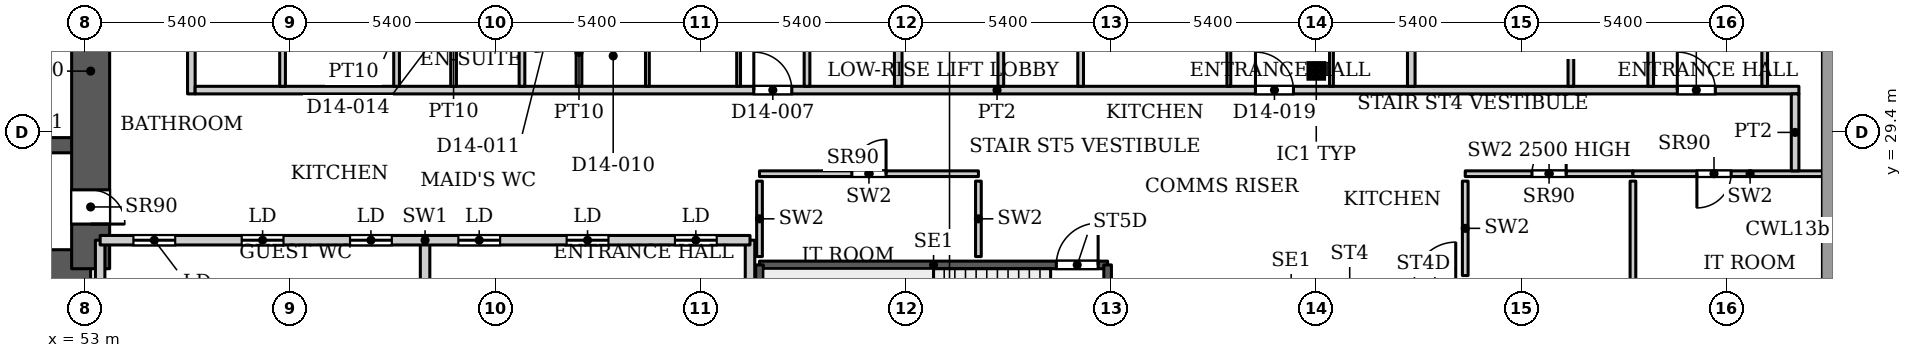
"""IFC4 building model, lengths in metres.
Left out: names, types, materials, properties, quantities, classifications, styles, units other than length and angle.
Written with IfcOpenShell. Run it as: python <this file> out.ifc"""

import sys

from ifc_helpers import new_model, si_unit, direction, frame, frame_2d, origin, origin_2d, place, context, subcontext, project, spatial, rectangle, hollow_rectangle, extrude, source, transform, mapped, element, fill, save


model = new_model("IFC4")
c1 = context("Model", 3, precision=1e-05, world=origin(), true_north=direction((0.0, 1.0)))
c2 = subcontext(c1, "Body", "Model", "MODEL_VIEW")
j1 = project(units=[si_unit("LENGTHUNIT", "METRE"), si_unit("PLANEANGLEUNIT", "RADIAN")], contexts=[c1])
p1 = place(None, origin())
s1 = spatial("IfcSite", under=j1, at=p1, CompositionType="ELEMENT")
p2 = place(p1, origin())
s2 = spatial("IfcBuilding", under=s1, at=p2, CompositionType="ELEMENT")
p3 = place(p2, frame((0.0, 0.0, 65.6)))
s3 = spatial("IfcBuildingStorey", under=s2, at=p3, CompositionType="ELEMENT", Elevation=65.6)
p4 = place(p3, frame((85.4, 31.005, 0.0), z_axis=(0.0, 0.0, 1.0), x_axis=(1.0, 0.0, 0.0)))
e1 = element("IfcColumn", 1, at=p4, inside=s3, PredefinedType="COLUMN", context=c2, shape_type="SweptSolid", body=[
    extrude(hollow_rectangle(XDim=0.356, YDim=0.356, WallThickness=0.016, InnerFilletRadius=0.016, OuterFilletRadius=0.032, at=origin_2d()), origin(), (0.0, 0.0, 1.0), 3.9),
])
p5 = place(p3, frame((34.75, 25.8, 0.0), z_axis=(0.0, 0.0, 1.0), x_axis=(1.0, 0.0, 0.0)))
e2 = element("IfcWall", 2, at=p5, inside=s3, PredefinedType="SHEAR", context=c2, shape_type="SweptSolid", body=[
    extrude(rectangle(XDim=18.4, YDim=1.0, at=frame_2d((9.2, 0.0))), origin(), (0.0, 0.0, 1.0), 3.9),
])
p6 = place(p3, frame((34.75, 29.05, 0.0), z_axis=(0.0, 0.0, 1.0), x_axis=(1.0, 0.0, 0.0)))
e3 = element("IfcWall", 3, at=p6, inside=s3, PredefinedType="SHEAR", context=c2, shape_type="SweptSolid", body=[
    extrude(rectangle(XDim=18.4, YDim=0.4, at=frame_2d((9.2, 0.0))), origin(), (0.0, 0.0, 1.0), 3.9),
])
p7 = place(p6, frame((15.125, 0.0, 0.0)))
e4 = element("IfcOpeningElement", 4, at=p7, cuts=e3, PredefinedType="OPENING", context=c2, shape_type="SweptSolid", body=[
    extrude(rectangle(XDim=1.1, YDim=2.2, at=frame_2d((0.55, 1.1))), frame((0.0, 0.21, 0.0), z_axis=(0.0, -1.0, 0.0), x_axis=(1.0, 0.0, 0.0)), (0.0, 0.0, 1.0), 0.42),
])
p8 = place(p3, frame((53.15, 25.8, 0.0), z_axis=(0.0, 0.0, 1.0), x_axis=(0.0, 1.0, 0.0)))
e5 = element("IfcWall", 5, at=p8, inside=s3, PredefinedType="SHEAR", context=c2, shape_type="SweptSolid", body=[
    extrude(rectangle(XDim=10.4, YDim=1.0, at=frame_2d((5.2, 0.0))), origin(), (0.0, 0.0, 1.0), 3.9),
])
p9 = place(p8, frame((1.175, 0.0, 0.0)))
e6 = element("IfcOpeningElement", 6, at=p9, cuts=e5, PredefinedType="OPENING", context=c2, shape_type="SweptSolid", body=[
    extrude(rectangle(XDim=0.9, YDim=2.2, at=frame_2d((0.45, 1.1))), frame((0.0, 0.51, 0.0), z_axis=(0.0, -1.0, 0.0), x_axis=(1.0, 0.0, 0.0)), (0.0, 0.0, 1.0), 1.02),
])
p10 = place(p3, frame((70.75, 25.9, 0.0), z_axis=(0.0, 0.0, 1.0), x_axis=(1.0, 0.0, 0.0)))
e7 = element("IfcWall", 7, at=p10, inside=s3, PredefinedType="SHEAR", context=c2, shape_type="SweptSolid", body=[
    extrude(rectangle(XDim=9.16, YDim=0.2, at=frame_2d((4.58, 0.0))), origin(), (0.0, 0.0, 1.0), 3.9),
])
p11 = place(p10, frame((7.81, 0.0, 0.0)))
e8 = element("IfcOpeningElement", 8, at=p11, cuts=e7, PredefinedType="OPENING", context=c2, shape_type="SweptSolid", body=[
    extrude(rectangle(XDim=1.1, YDim=2.2, at=frame_2d((0.55, 1.1))), frame((0.0, 0.11, 0.0), z_axis=(0.0, -1.0, 0.0), x_axis=(1.0, 0.0, 0.0)), (0.0, 0.0, 1.0), 0.22),
])
for number, where, z_axis, x_axis in (
    (9, (70.75, 22.75, 0.0), (0.0, 0.0, 1.0), (0.0, 1.0, 0.0)),
    (10, (79.91, 22.75, 0.0), (0.0, 0.0, 1.0), (0.0, 1.0, 0.0)),
):
    element("IfcWall", number, at=place(p3, frame(where, z_axis=z_axis, x_axis=x_axis)), inside=s3, PredefinedType="SHEAR", context=c2, shape_type="SweptSolid", body=[
        extrude(rectangle(XDim=3.15, YDim=0.2, at=frame_2d((1.575, 0.0))), origin(), (0.0, 0.0, 1.0), 3.9),
    ])
for number, where, z_axis, x_axis in (
    (11, (53.4, 23.7, 0.0), (0.0, 0.0, 1.0), (0.0, 1.0, 0.0)),
    (12, (61.95, 23.7, 0.0), (0.0, 0.0, 1.0), (0.0, 1.0, 0.0)),
    (13, (70.5, 23.7, 0.0), (0.0, 0.0, 1.0), (0.0, 1.0, 0.0)),
):
    element("IfcWall", number, at=place(p3, frame(where, z_axis=z_axis, x_axis=x_axis)), inside=s3, PredefinedType="PARTITIONING", context=c2, shape_type="SweptSolid", body=[
        extrude(rectangle(XDim=2.85, YDim=0.25, at=frame_2d((1.425, 0.0))), origin(), (0.0, 0.0, 1.0), 3.9),
    ])
p12 = place(p3, frame((53.4, 26.55, 0.0), z_axis=(0.0, 0.0, 1.0), x_axis=(1.0, 0.0, 0.0)))
e14 = element("IfcWall", 14, at=p12, inside=s3, PredefinedType="PARTITIONING", context=c2, shape_type="SweptSolid", body=[
    extrude(rectangle(XDim=17.1, YDim=0.25, at=frame_2d((8.55, 0.0))), origin(), (0.0, 0.0, 1.0), 3.9),
])
p13 = place(p12, frame((0.875, 0.0, 0.0)))
e15 = element("IfcOpeningElement", 15, at=p13, cuts=e14, PredefinedType="OPENING", context=c2, shape_type="SweptSolid", body=[
    extrude(rectangle(XDim=1.1, YDim=2.2, at=frame_2d((0.55, 1.1))), frame((0.0, 0.135, 0.0), z_axis=(0.0, -1.0, 0.0), x_axis=(1.0, 0.0, 0.0)), (0.0, 0.0, 1.0), 0.27),
])
p14 = place(p12, frame((3.725, 0.0, 0.0)))
e16 = element("IfcOpeningElement", 16, at=p14, cuts=e14, PredefinedType="OPENING", context=c2, shape_type="SweptSolid", body=[
    extrude(rectangle(XDim=1.1, YDim=2.2, at=frame_2d((0.55, 1.1))), frame((0.0, 0.135, 0.0), z_axis=(0.0, -1.0, 0.0), x_axis=(1.0, 0.0, 0.0)), (0.0, 0.0, 1.0), 0.27),
])
p15 = place(p12, frame((6.575, 0.0, 0.0)))
e17 = element("IfcOpeningElement", 17, at=p15, cuts=e14, PredefinedType="OPENING", context=c2, shape_type="SweptSolid", body=[
    extrude(rectangle(XDim=1.1, YDim=2.2, at=frame_2d((0.55, 1.1))), frame((0.0, 0.135, 0.0), z_axis=(0.0, -1.0, 0.0), x_axis=(1.0, 0.0, 0.0)), (0.0, 0.0, 1.0), 0.27),
])
p16 = place(p12, frame((9.425, 0.0, 0.0)))
e18 = element("IfcOpeningElement", 18, at=p16, cuts=e14, PredefinedType="OPENING", context=c2, shape_type="SweptSolid", body=[
    extrude(rectangle(XDim=1.1, YDim=2.2, at=frame_2d((0.55, 1.1))), frame((0.0, 0.135, 0.0), z_axis=(0.0, -1.0, 0.0), x_axis=(1.0, 0.0, 0.0)), (0.0, 0.0, 1.0), 0.27),
])
p17 = place(p12, frame((12.275, 0.0, 0.0)))
e19 = element("IfcOpeningElement", 19, at=p17, cuts=e14, PredefinedType="OPENING", context=c2, shape_type="SweptSolid", body=[
    extrude(rectangle(XDim=1.1, YDim=2.2, at=frame_2d((0.55, 1.1))), frame((0.0, 0.135, 0.0), z_axis=(0.0, -1.0, 0.0), x_axis=(1.0, 0.0, 0.0)), (0.0, 0.0, 1.0), 0.27),
])
p18 = place(p12, frame((15.125, 0.0, 0.0)))
e20 = element("IfcOpeningElement", 20, at=p18, cuts=e14, PredefinedType="OPENING", context=c2, shape_type="SweptSolid", body=[
    extrude(rectangle(XDim=1.1, YDim=2.2, at=frame_2d((0.55, 1.1))), frame((0.0, 0.135, 0.0), z_axis=(0.0, -1.0, 0.0), x_axis=(1.0, 0.0, 0.0)), (0.0, 0.0, 1.0), 0.27),
])
p19 = place(p3, frame((70.75, 28.3, 0.0), z_axis=(0.0, 0.0, 1.0), x_axis=(1.0, 0.0, 0.0)))
e21 = element("IfcWall", 21, at=p19, inside=s3, PredefinedType="PARTITIONING", context=c2, shape_type="SweptSolid", body=[
    extrude(rectangle(XDim=5.76, YDim=0.15, at=frame_2d((2.88, 0.0))), origin(), (0.0, 0.0, 1.0), 3.9),
])
p20 = place(p19, frame((2.43, 0.0, 0.0)))
e22 = element("IfcOpeningElement", 22, at=p20, cuts=e21, PredefinedType="OPENING", context=c2, shape_type="SweptSolid", body=[
    extrude(rectangle(XDim=0.9, YDim=2.2, at=frame_2d((0.45, 1.1))), frame((0.0, 0.085, 0.0), z_axis=(0.0, -1.0, 0.0), x_axis=(1.0, 0.0, 0.0)), (0.0, 0.0, 1.0), 0.17),
])
for number, where, z_axis, x_axis in (
    (23, (70.75, 26.12, 0.0), (0.0, 0.0, 1.0), (0.0, 1.0, 0.0)),
    (24, (76.51, 26.12, 0.0), (0.0, 0.0, 1.0), (0.0, 1.0, 0.0)),
):
    element("IfcWall", number, at=place(p3, frame(where, z_axis=z_axis, x_axis=x_axis)), inside=s3, PredefinedType="PARTITIONING", context=c2, shape_type="SweptSolid", body=[
        extrude(rectangle(XDim=1.985, YDim=0.15, at=frame_2d((0.992, 0.0))), origin(), (0.0, 0.0, 1.0), 3.9),
    ])
p21 = place(p3, frame((89.32, 28.3, 0.0), z_axis=(0.0, 0.0, 1.0), x_axis=(1.0, 0.0, 0.0)))
e25 = element("IfcWall", 25, at=p21, inside=s3, PredefinedType="PARTITIONING", context=c2, shape_type="SweptSolid", body=[
    extrude(rectangle(XDim=4.413, YDim=0.15, at=frame_2d((2.207, 0.0))), origin(), (0.0, 0.0, 1.0), 2.5),
])
p22 = place(p21, frame((1.756, 0.0, 0.0)))
e26 = element("IfcOpeningElement", 26, at=p22, cuts=e25, PredefinedType="OPENING", context=c2, shape_type="SweptSolid", body=[
    extrude(rectangle(XDim=0.9, YDim=2.2, at=frame_2d((0.45, 1.1))), frame((0.0, 0.085, 0.0), z_axis=(0.0, -1.0, 0.0), x_axis=(1.0, 0.0, 0.0)), (0.0, 0.0, 1.0), 0.17),
])
p23 = place(p3, frame((89.32, 25.62, 0.0), z_axis=(0.0, 0.0, 1.0), x_axis=(0.0, 1.0, 0.0)))
e27 = element("IfcWall", 27, at=p23, inside=s3, PredefinedType="PARTITIONING", context=c2, shape_type="SweptSolid", body=[
    extrude(rectangle(XDim=2.485, YDim=0.15, at=frame_2d((1.242, 0.0))), origin(), (0.0, 0.0, 1.0), 3.9),
])
p24 = place(p3, frame((93.733, 21.338, 0.0), z_axis=(0.0, 0.0, 1.0), x_axis=(0.0, 1.0, 0.0)))
e28 = element("IfcWall", 28, at=p24, inside=s3, PredefinedType="PARTITIONING", context=c2, shape_type="SweptSolid", body=[
    extrude(rectangle(XDim=6.767, YDim=0.15, at=frame_2d((3.384, 0.0))), origin(), (0.0, 0.0, 1.0), 3.9),
])
p25 = place(p3, frame((93.733, 28.3, 0.0), z_axis=(0.0, 0.0, 1.0), x_axis=(1.0, 0.0, 0.0)))
e29 = element("IfcWall", 29, at=p25, inside=s3, PredefinedType="PARTITIONING", context=c2, shape_type="SweptSolid", body=[
    extrude(rectangle(XDim=6.165, YDim=0.15, at=frame_2d((3.083, 0.0))), origin(), (0.0, 0.0, 1.0), 3.9),
])
p26 = place(p25, frame((1.683, 0.0, 0.0)))
e30 = element("IfcOpeningElement", 30, at=p26, cuts=e29, PredefinedType="OPENING", context=c2, shape_type="SweptSolid", body=[
    extrude(rectangle(XDim=0.9, YDim=2.2, at=frame_2d((0.45, 1.1))), frame((0.0, 0.085, 0.0), z_axis=(0.0, -1.0, 0.0), x_axis=(1.0, 0.0, 0.0)), (0.0, 0.0, 1.0), 0.17),
])
p27 = place(p3, frame((55.8, 30.4, 0.0), z_axis=(0.0, 0.0, 1.0), x_axis=(0.0, 1.0, 0.0)))
e31 = element("IfcWall", 31, at=p27, inside=s3, PredefinedType="PARTITIONING", context=c2, shape_type="SweptSolid", body=[
    extrude(rectangle(XDim=13.5, YDim=0.2, at=frame_2d((6.75, 0.0))), origin(), (0.0, 0.0, 1.0), 3.6),
])
p28 = place(p3, frame((55.9, 30.5, 0.0), z_axis=(0.0, 0.0, 1.0), x_axis=(1.0, 0.0, 0.0)))
e32 = element("IfcWall", 32, at=p28, inside=s3, PredefinedType="PARTITIONING", context=c2, shape_type="SweptSolid", body=[
    extrude(rectangle(XDim=42.2, YDim=0.2, at=frame_2d((21.1, 0.0))), origin(), (0.0, 0.0, 1.0), 3.6),
])
p29 = place(p28, frame((14.7, 0.0, 0.0)))
e33 = element("IfcOpeningElement", 33, at=p29, cuts=e32, PredefinedType="OPENING", context=c2, shape_type="SweptSolid", body=[
    extrude(rectangle(XDim=1.0, YDim=2.1, at=frame_2d((0.5, 1.05))), frame((0.0, 0.11, 0.0), z_axis=(0.0, -1.0, 0.0), x_axis=(1.0, 0.0, 0.0)), (0.0, 0.0, 1.0), 0.22),
])
p30 = place(p28, frame((27.9, 0.0, 0.0)))
e34 = element("IfcOpeningElement", 34, at=p30, cuts=e32, PredefinedType="OPENING", context=c2, shape_type="SweptSolid", body=[
    extrude(rectangle(XDim=1.0, YDim=2.1, at=frame_2d((0.5, 1.05))), frame((0.0, 0.11, 0.0), z_axis=(0.0, -1.0, 0.0), x_axis=(1.0, 0.0, 0.0)), (0.0, 0.0, 1.0), 0.22),
])
p31 = place(p28, frame((39.0, 0.0, 0.0)))
e35 = element("IfcOpeningElement", 35, at=p31, cuts=e32, PredefinedType="OPENING", context=c2, shape_type="SweptSolid", body=[
    extrude(rectangle(XDim=1.0, YDim=2.1, at=frame_2d((0.5, 1.05))), frame((0.0, 0.11, 0.0), z_axis=(0.0, -1.0, 0.0), x_axis=(1.0, 0.0, 0.0)), (0.0, 0.0, 1.0), 0.22),
])
p32 = place(p3, frame((58.2, 30.6, 0.0), z_axis=(0.0, 0.0, 1.0), x_axis=(0.0, 1.0, 0.0)))
e36 = element("IfcWall", 36, at=p32, inside=s3, PredefinedType="PARTITIONING", context=c2, shape_type="SweptSolid", body=[
    extrude(rectangle(XDim=3.025, YDim=0.15, at=frame_2d((1.512, 0.0))), origin(), (0.0, 0.0, 1.0), 3.072),
])
for number, where, z_axis, x_axis in (
    (37, (61.2, 30.6, 0.0), (0.0, 0.0, 1.0), (0.0, 1.0, 0.0)),
    (38, (62.7, 30.6, 0.0), (0.0, 0.0, 1.0), (0.0, 1.0, 0.0)),
    (39, (64.5, 30.6, 0.0), (0.0, 0.0, 1.0), (0.0, 1.0, 0.0)),
):
    element("IfcWall", number, at=place(p3, frame(where, z_axis=z_axis, x_axis=x_axis)), inside=s3, PredefinedType="PARTITIONING", context=c2, shape_type="SweptSolid", body=[
        extrude(rectangle(XDim=3.025, YDim=0.15, at=frame_2d((1.512, 0.0))), origin(), (0.0, 0.0, 1.0), 3.6),
    ])
p33 = place(p3, frame((66.0, 30.6, 0.0), z_axis=(0.0, 0.0, 1.0), x_axis=(0.0, 1.0, 0.0)))
e40 = element("IfcWall", 40, at=p33, inside=s3, PredefinedType="PARTITIONING", context=c2, shape_type="SweptSolid", body=[
    extrude(rectangle(XDim=1.775, YDim=0.15, at=frame_2d((0.887, 0.0))), origin(), (0.0, 0.0, 1.0), 3.6),
])
for number, where, z_axis, x_axis in (
    (41, (67.8, 30.6, 0.0), (0.0, 0.0, 1.0), (0.0, 1.0, 0.0)),
    (42, (70.2, 30.6, 0.0), (0.0, 0.0, 1.0), (0.0, 1.0, 0.0)),
):
    element("IfcWall", number, at=place(p3, frame(where, z_axis=z_axis, x_axis=x_axis)), inside=s3, PredefinedType="PARTITIONING", context=c2, shape_type="SweptSolid", body=[
        extrude(rectangle(XDim=3.025, YDim=0.1, at=frame_2d((1.512, 0.0))), origin(), (0.0, 0.0, 1.0), 3.6),
    ])
p34 = place(p3, frame((72.0, 30.6, 0.0), z_axis=(0.0, 0.0, 1.0), x_axis=(0.0, 1.0, 0.0)))
e43 = element("IfcWall", 43, at=p34, inside=s3, PredefinedType="PARTITIONING", context=c2, shape_type="SweptSolid", body=[
    extrude(rectangle(XDim=3.175, YDim=0.15, at=frame_2d((1.587, 0.0))), origin(), (0.0, 0.0, 1.0), 3.6),
])
p35 = place(p3, frame((74.4, 30.6, 0.0), z_axis=(0.0, 0.0, 1.0), x_axis=(0.0, 1.0, 0.0)))
e44 = element("IfcWall", 44, at=p35, inside=s3, PredefinedType="PARTITIONING", context=c2, shape_type="SweptSolid", body=[
    extrude(rectangle(XDim=13.3, YDim=0.2, at=frame_2d((6.65, 0.0))), origin(), (0.0, 0.0, 1.0), 3.6),
])
for number, where, z_axis, x_axis in (
    (45, (77.1, 30.6, 0.0), (0.0, 0.0, 1.0), (0.0, 1.0, 0.0)),
    (46, (79.2, 30.6, 0.0), (0.0, 0.0, 1.0), (0.0, 1.0, 0.0)),
):
    element("IfcWall", number, at=place(p3, frame(where, z_axis=z_axis, x_axis=x_axis)), inside=s3, PredefinedType="PARTITIONING", context=c2, shape_type="SweptSolid", body=[
        extrude(rectangle(XDim=3.025, YDim=0.15, at=frame_2d((1.512, 0.0))), origin(), (0.0, 0.0, 1.0), 3.6),
    ])
for number, where, z_axis, x_axis in (
    (47, (83.1, 30.6, 0.0), (0.0, 0.0, 1.0), (0.0, 1.0, 0.0)),
    (48, (85.8, 30.6, 0.0), (0.0, 0.0, 1.0), (0.0, 1.0, 0.0)),
):
    element("IfcWall", number, at=place(p3, frame(where, z_axis=z_axis, x_axis=x_axis)), inside=s3, PredefinedType="PARTITIONING", context=c2, shape_type="SweptSolid", body=[
        extrude(rectangle(XDim=3.025, YDim=0.1, at=frame_2d((1.512, 0.0))), origin(), (0.0, 0.0, 1.0), 3.6),
    ])
p36 = place(p3, frame((87.9, 30.6, 0.0), z_axis=(0.0, 0.0, 1.0), x_axis=(0.0, 1.0, 0.0)))
e49 = element("IfcWall", 49, at=p36, inside=s3, PredefinedType="PARTITIONING", context=c2, shape_type="SweptSolid", body=[
    extrude(rectangle(XDim=13.3, YDim=0.2, at=frame_2d((6.65, 0.0))), origin(), (0.0, 0.0, 1.0), 3.6),
])
for number, where, z_axis, x_axis in (
    (50, (92.1, 30.6, 0.0), (0.0, 0.0, 1.0), (0.0, 1.0, 0.0)),
    (51, (94.2, 30.6, 0.0), (0.0, 0.0, 1.0), (0.0, 1.0, 0.0)),
):
    element("IfcWall", number, at=place(p3, frame(where, z_axis=z_axis, x_axis=x_axis)), inside=s3, PredefinedType="PARTITIONING", context=c2, shape_type="SweptSolid", body=[
        extrude(rectangle(XDim=3.025, YDim=0.15, at=frame_2d((1.512, 0.0))), origin(), (0.0, 0.0, 1.0), 3.6),
    ])
p37 = place(p3, frame((97.2, 30.6, 0.0), z_axis=(0.0, 0.0, 1.0), x_axis=(0.0, 1.0, 0.0)))
e52 = element("IfcWall", 52, at=p37, inside=s3, PredefinedType="PARTITIONING", context=c2, shape_type="SweptSolid", body=[
    extrude(rectangle(XDim=3.175, YDim=0.15, at=frame_2d((1.587, 0.0))), origin(), (0.0, 0.0, 1.0), 3.6),
])
p38 = place(p3, frame((98.0, 28.374, 0.0), z_axis=(0.0, 0.0, 1.0), x_axis=(0.0, 1.0, 0.0)))
e53 = element("IfcWall", 53, at=p38, inside=s3, PredefinedType="PARTITIONING", context=c2, shape_type="SweptSolid", body=[
    extrude(rectangle(XDim=2.026, YDim=0.2, at=frame_2d((1.013, 0.0))), origin(), (0.0, 0.0, 1.0), 3.6),
])
m1 = source(origin(), c2, "Body", "SweptSolid", [
    extrude(rectangle(XDim=1.1, YDim=2.2, at=frame_2d((0.55, 1.1))), frame((0.0, 0.025, 0.0), z_axis=(0.0, -1.0, 0.0), x_axis=(1.0, 0.0, 0.0)), (0.0, 0.0, 1.0), 0.05),
])
p39 = place(p13, origin())
e54 = element("IfcDoor", 54, at=p39, inside=s3, OperationType="SLIDING_TO_LEFT", PredefinedType="DOOR", context=c2, shape_type="MappedRepresentation", body=[
    mapped(m1, transform((0.0, 0.0, 0.0), x_axis=(1.0, 0.0, 0.0), y_axis=(0.0, 1.0, 0.0), z_axis=(0.0, 0.0, 1.0), scale=1.0)),
])
fill(e15, e54)
p40 = place(p14, origin())
e55 = element("IfcDoor", 55, at=p40, inside=s3, OperationType="SLIDING_TO_LEFT", PredefinedType="DOOR", context=c2, shape_type="MappedRepresentation", body=[
    mapped(m1, transform((0.0, 0.0, 0.0), x_axis=(1.0, 0.0, 0.0), y_axis=(0.0, 1.0, 0.0), z_axis=(0.0, 0.0, 1.0), scale=1.0)),
])
fill(e16, e55)
p41 = place(p15, origin())
e56 = element("IfcDoor", 56, at=p41, inside=s3, OperationType="SLIDING_TO_LEFT", PredefinedType="DOOR", context=c2, shape_type="MappedRepresentation", body=[
    mapped(m1, transform((0.0, 0.0, 0.0), x_axis=(1.0, 0.0, 0.0), y_axis=(0.0, 1.0, 0.0), z_axis=(0.0, 0.0, 1.0), scale=1.0)),
])
fill(e17, e56)
p42 = place(p16, origin())
e57 = element("IfcDoor", 57, at=p42, inside=s3, OperationType="SLIDING_TO_LEFT", PredefinedType="DOOR", context=c2, shape_type="MappedRepresentation", body=[
    mapped(m1, transform((0.0, 0.0, 0.0), x_axis=(1.0, 0.0, 0.0), y_axis=(0.0, 1.0, 0.0), z_axis=(0.0, 0.0, 1.0), scale=1.0)),
])
fill(e18, e57)
p43 = place(p17, origin())
e58 = element("IfcDoor", 58, at=p43, inside=s3, OperationType="SLIDING_TO_LEFT", PredefinedType="DOOR", context=c2, shape_type="MappedRepresentation", body=[
    mapped(m1, transform((0.0, 0.0, 0.0), x_axis=(1.0, 0.0, 0.0), y_axis=(0.0, 1.0, 0.0), z_axis=(0.0, 0.0, 1.0), scale=1.0)),
])
fill(e19, e58)
p44 = place(p18, origin())
e59 = element("IfcDoor", 59, at=p44, inside=s3, OperationType="SLIDING_TO_LEFT", PredefinedType="DOOR", context=c2, shape_type="MappedRepresentation", body=[
    mapped(m1, transform((0.0, 0.0, 0.0), x_axis=(1.0, 0.0, 0.0), y_axis=(0.0, 1.0, 0.0), z_axis=(0.0, 0.0, 1.0), scale=1.0)),
])
fill(e20, e59)
m2 = source(origin(), c2, "Body", "SweptSolid", [
    extrude(rectangle(XDim=0.9, YDim=2.2, at=frame_2d((0.45, 1.1))), frame((0.0, 0.025, 0.0), z_axis=(0.0, -1.0, 0.0), x_axis=(1.0, 0.0, 0.0)), (0.0, 0.0, 1.0), 0.05),
])
p45 = place(p9, origin())
e60 = element("IfcDoor", 60, at=p45, inside=s3, OperationType="SINGLE_SWING_RIGHT", PredefinedType="DOOR", context=c2, shape_type="MappedRepresentation", body=[
    mapped(m2, transform((0.0, 0.0, 0.0), x_axis=(1.0, 0.0, 0.0), y_axis=(0.0, 1.0, 0.0), z_axis=(0.0, 0.0, 1.0), scale=1.0)),
])
fill(e6, e60)
p46 = place(p20, origin())
e61 = element("IfcDoor", 61, at=p46, inside=s3, OperationType="SINGLE_SWING_LEFT", PredefinedType="DOOR", context=c2, shape_type="MappedRepresentation", body=[
    mapped(m2, transform((0.0, 0.0, 0.0), x_axis=(1.0, 0.0, 0.0), y_axis=(0.0, 1.0, 0.0), z_axis=(0.0, 0.0, 1.0), scale=1.0)),
])
fill(e22, e61)
p47 = place(p22, origin())
e62 = element("IfcDoor", 62, at=p47, inside=s3, OperationType="SINGLE_SWING_LEFT", PredefinedType="DOOR", context=c2, shape_type="MappedRepresentation", body=[
    mapped(m2, transform((0.0, 0.0, 0.0), x_axis=(1.0, 0.0, 0.0), y_axis=(0.0, 1.0, 0.0), z_axis=(0.0, 0.0, 1.0), scale=1.0)),
])
fill(e26, e62)
p48 = place(p26, origin())
e63 = element("IfcDoor", 63, at=p48, inside=s3, OperationType="SINGLE_SWING_RIGHT", PredefinedType="DOOR", context=c2, shape_type="MappedRepresentation", body=[
    mapped(m2, transform((0.0, 0.0, 0.0), x_axis=(1.0, 0.0, 0.0), y_axis=(0.0, 1.0, 0.0), z_axis=(0.0, 0.0, 1.0), scale=1.0)),
])
fill(e30, e63)
m3 = source(origin(), c2, "Body", "SweptSolid", [
    extrude(rectangle(XDim=1.1, YDim=2.2, at=frame_2d((0.55, 1.1))), frame((0.0, 0.025, 0.0), z_axis=(0.0, -1.0, 0.0), x_axis=(1.0, 0.0, 0.0)), (0.0, 0.0, 1.0), 0.05),
])
p49 = place(p11, origin())
e64 = element("IfcDoor", 64, at=p49, inside=s3, OperationType="SINGLE_SWING_LEFT", PredefinedType="DOOR", context=c2, shape_type="MappedRepresentation", body=[
    mapped(m3, transform((0.0, 0.0, 0.0), x_axis=(1.0, 0.0, 0.0), y_axis=(0.0, 1.0, 0.0), z_axis=(0.0, 0.0, 1.0), scale=1.0)),
])
fill(e8, e64)
m4 = source(origin(), c2, "Body", "SweptSolid", [
    extrude(rectangle(XDim=1.0, YDim=2.1, at=frame_2d((0.5, 1.05))), frame((0.0, 0.025, 0.0), z_axis=(0.0, -1.0, 0.0), x_axis=(1.0, 0.0, 0.0)), (0.0, 0.0, 1.0), 0.05),
])
p50 = place(p29, origin())
e65 = element("IfcDoor", 65, at=p50, inside=s3, OperationType="SINGLE_SWING_LEFT", PredefinedType="DOOR", context=c2, shape_type="MappedRepresentation", body=[
    mapped(m4, transform((0.0, 0.0, 0.0), x_axis=(1.0, 0.0, 0.0), y_axis=(0.0, 1.0, 0.0), z_axis=(0.0, 0.0, 1.0), scale=1.0)),
])
fill(e33, e65)
p51 = place(p30, origin())
e66 = element("IfcDoor", 66, at=p51, inside=s3, OperationType="SINGLE_SWING_LEFT", PredefinedType="DOOR", context=c2, shape_type="MappedRepresentation", body=[
    mapped(m4, transform((0.0, 0.0, 0.0), x_axis=(1.0, 0.0, 0.0), y_axis=(0.0, 1.0, 0.0), z_axis=(0.0, 0.0, 1.0), scale=1.0)),
])
fill(e34, e66)
p52 = place(p31, origin())
e67 = element("IfcDoor", 67, at=p52, inside=s3, OperationType="SINGLE_SWING_LEFT", PredefinedType="DOOR", context=c2, shape_type="MappedRepresentation", body=[
    mapped(m4, transform((0.0, 0.0, 0.0), x_axis=(1.0, 0.0, 0.0), y_axis=(0.0, 1.0, 0.0), z_axis=(0.0, 0.0, 1.0), scale=1.0)),
])
fill(e35, e67)
save(model, sys.argv[1])
